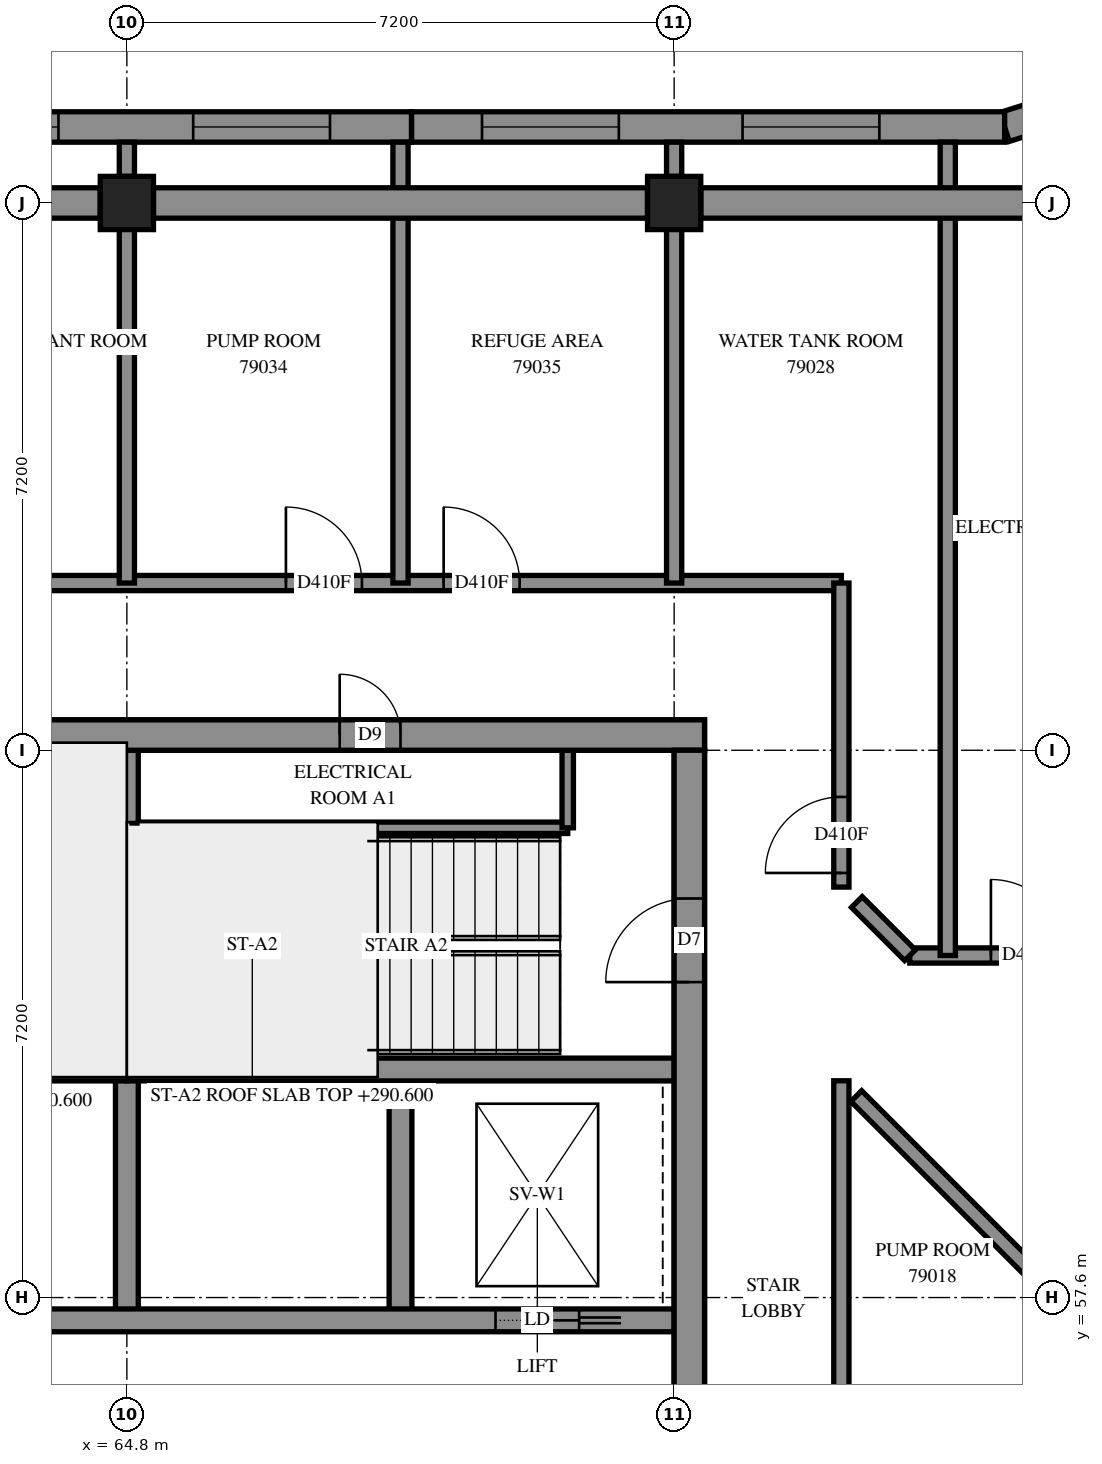
"""IFC4 building model, lengths in metres.
Left out: names, types, materials, properties, quantities, classifications, styles, units other than length and angle.
Written with IfcOpenShell. Run it as: python <this file> out.ifc"""

import sys

from ifc_helpers import new_model, si_unit, direction, frame, frame_2d, origin, origin_2d, place, context, subcontext, project, spatial, polyline, rectangle, outline, extrude, element, fill, save


model = new_model("IFC4")
c1 = context("Model", 3, precision=1e-05, world=origin(), true_north=direction((0.0, 1.0)))
c2 = subcontext(c1, "Body", "Model", "MODEL_VIEW")
j1 = project(units=[si_unit("LENGTHUNIT", "METRE"), si_unit("PLANEANGLEUNIT", "RADIAN")], contexts=[c1])
p1 = place(None, origin())
s1 = spatial("IfcSite", under=j1, at=p1, CompositionType="ELEMENT")
p2 = place(p1, origin())
s2 = spatial("IfcBuilding", under=s1, at=p2, CompositionType="ELEMENT")
p3 = place(p2, frame((0.0, 0.0, 290.6)))
s3 = spatial("IfcBuildingStorey", under=s2, at=p3, CompositionType="ELEMENT", Elevation=290.6)
for number, where, z_axis, x_axis in (
    (1, (64.8, 72.0, 0.0), (0.0, 0.0, 1.0), (1.0, 0.0, 0.0)),
    (2, (72.0, 72.0, 0.0), (0.0, 0.0, 1.0), (1.0, 0.0, 0.0)),
):
    element("IfcColumn", number, at=place(p3, frame(where, z_axis=z_axis, x_axis=x_axis)), inside=s3, PredefinedType="COLUMN", context=c2, shape_type="SweptSolid", body=[
        extrude(rectangle(XDim=0.7, YDim=0.7, at=origin_2d()), origin(), (0.0, 0.0, 1.0), 3.5),
    ])
p4 = place(p3, frame((57.2, 65.0, -0.3), z_axis=(0.0, 0.0, 1.0), x_axis=(1.0, 0.0, 0.0)))
e3 = element("IfcWall", 3, at=p4, inside=s3, PredefinedType="SHEAR", context=c2, shape_type="SweptSolid", body=[
    extrude(rectangle(XDim=15.2, YDim=0.4, at=frame_2d((7.6, 0.0))), origin(), (0.0, 0.0, 1.0), 3.1),
])
p5 = place(p4, frame((10.4, 0.0, 0.3)))
e4 = element("IfcOpeningElement", 4, at=p5, cuts=e3, PredefinedType="OPENING", context=c2, shape_type="SweptSolid", body=[
    extrude(rectangle(XDim=0.8, YDim=2.1, at=frame_2d((0.4, 1.05))), frame((0.0, 0.21, 0.0), z_axis=(0.0, -1.0, 0.0), x_axis=(1.0, 0.0, 0.0)), (0.0, 0.0, 1.0), 0.42),
])
p6 = place(p3, frame((72.2, 50.4, -0.3), z_axis=(0.0, 0.0, 1.0), x_axis=(0.0, 1.0, 0.0)))
e5 = element("IfcWall", 5, at=p6, inside=s3, PredefinedType="SHEAR", context=c2, shape_type="SweptSolid", body=[
    extrude(rectangle(XDim=14.4, YDim=0.4, at=frame_2d((7.2, 0.0))), origin(), (0.0, 0.0, 1.0), 3.1),
])
p7 = place(p6, frame((4.55, 0.0, 0.3)))
e6 = element("IfcOpeningElement", 6, at=p7, cuts=e5, PredefinedType="OPENING", context=c2, shape_type="SweptSolid", body=[
    extrude(rectangle(XDim=1.1, YDim=2.1, at=frame_2d((0.55, 1.05))), frame((0.0, 0.21, 0.0), z_axis=(0.0, -1.0, 0.0), x_axis=(1.0, 0.0, 0.0)), (0.0, 0.0, 1.0), 0.42),
])
p8 = place(p6, frame((11.35, 0.0, 0.3)))
e7 = element("IfcOpeningElement", 7, at=p8, cuts=e5, PredefinedType="OPENING", context=c2, shape_type="SweptSolid", body=[
    extrude(rectangle(XDim=1.1, YDim=2.1, at=frame_2d((0.55, 1.05))), frame((0.0, 0.21, 0.0), z_axis=(0.0, -1.0, 0.0), x_axis=(1.0, 0.0, 0.0)), (0.0, 0.0, 1.0), 0.42),
])
for number, where, z_axis, x_axis in (
    (8, (64.8, 57.3, 0.0), (0.0, 0.0, 1.0), (0.0, 1.0, 0.0)),
    (9, (68.4, 57.3, 0.0), (0.0, 0.0, 1.0), (0.0, 1.0, 0.0)),
):
    element("IfcWall", number, at=place(p3, frame(where, z_axis=z_axis, x_axis=x_axis)), inside=s3, PredefinedType="SOLIDWALL", context=c2, shape_type="SweptSolid", body=[
        extrude(rectangle(XDim=3.3, YDim=0.3, at=frame_2d((1.65, 0.0))), origin(), (0.0, 0.0, 1.0), 3.5),
    ])
p9 = place(p3, frame((57.6, 57.3, 0.0), z_axis=(0.0, 0.0, 1.0), x_axis=(1.0, 0.0, 0.0)))
e10 = element("IfcWall", 10, at=p9, inside=s3, PredefinedType="SOLIDWALL", context=c2, shape_type="SweptSolid", body=[
    extrude(rectangle(XDim=14.4, YDim=0.3, at=frame_2d((7.2, 0.0))), origin(), (0.0, 0.0, 1.0), 3.5),
])
p10 = place(p9, frame((12.05, 0.0, 0.0)))
e11 = element("IfcOpeningElement", 11, at=p10, cuts=e10, PredefinedType="OPENING", context=c2, shape_type="SweptSolid", body=[
    extrude(rectangle(XDim=1.1, YDim=2.1, at=frame_2d((0.55, 1.05))), frame((0.0, 0.16, 0.0), z_axis=(0.0, -1.0, 0.0), x_axis=(1.0, 0.0, 0.0)), (0.0, 0.0, 1.0), 0.32),
])
for number, where, z_axis, x_axis in (
    (12, (57.6, 60.6, 0.0), (0.0, 0.0, 1.0), (1.0, 0.0, 0.0)),
    (13, (64.8, 60.6, 0.0), (0.0, 0.0, 1.0), (1.0, 0.0, 0.0)),
):
    element("IfcWall", number, at=place(p3, frame(where, z_axis=z_axis, x_axis=x_axis)), inside=s3, PredefinedType="SOLIDWALL", context=c2, shape_type="SweptSolid", body=[
        extrude(rectangle(XDim=7.2, YDim=0.3, at=frame_2d((3.6, 0.0))), origin(), (0.0, 0.0, 1.0), 3.5),
    ])
p11 = place(p3, frame((64.8, 60.6, 0.0), z_axis=(0.0, 0.0, 1.0), x_axis=(0.0, 1.0, 0.0)))
e14 = element("IfcWall", 14, at=p11, inside=s3, PredefinedType="SOLIDWALL", context=c2, shape_type="SweptSolid", body=[
    extrude(rectangle(XDim=4.2, YDim=0.3, at=frame_2d((2.1, 0.0))), origin(), (0.0, 0.0, 1.0), 3.5),
])
p12 = place(p3, frame((76.513, 49.231, -0.3), z_axis=(0.0, 0.0, 1.0), x_axis=(0.7071067812, 0.7071067812, 0.0)))
e15 = element("IfcWall", 15, at=p12, inside=s3, PredefinedType="SHEAR", context=c2, shape_type="SweptSolid", body=[
    extrude(rectangle(XDim=14.4, YDim=0.4, at=frame_2d((7.2, 0.0))), origin(), (0.0, 0.0, 1.0), 3.1),
])
p13 = place(p12, frame((4.55, 0.0, 0.3)))
e16 = element("IfcOpeningElement", 16, at=p13, cuts=e15, PredefinedType="OPENING", context=c2, shape_type="SweptSolid", body=[
    extrude(rectangle(XDim=1.1, YDim=2.1, at=frame_2d((0.55, 1.05))), frame((0.0, 0.21, 0.0), z_axis=(0.0, -1.0, 0.0), x_axis=(1.0, 0.0, 0.0)), (0.0, 0.0, 1.0), 0.42),
])
p14 = place(p12, frame((11.35, 0.0, 0.3)))
e17 = element("IfcOpeningElement", 17, at=p14, cuts=e15, PredefinedType="OPENING", context=c2, shape_type="SweptSolid", body=[
    extrude(rectangle(XDim=1.1, YDim=2.1, at=frame_2d((0.55, 1.05))), frame((0.0, 0.21, 0.0), z_axis=(0.0, -1.0, 0.0), x_axis=(1.0, 0.0, 0.0)), (0.0, 0.0, 1.0), 0.42),
])
p15 = place(p3, frame((80.096, 74.189, 0.0), z_axis=(0.0, 0.0, 1.0), x_axis=(-0.9531812986, -0.3023994247, 0.0)))
e18 = element("IfcWall", 18, at=p15, inside=s3, PredefinedType="SOLIDWALL", context=c2, shape_type="SweptSolid", body=[
    extrude(outline(polyline([(-0.176, -0.2), (3.901, -0.2), (3.963, 0.2), (0.176, 0.2), (-0.176, -0.2)])), origin(), (0.0, 0.0, 1.0), 3.5),
])
p16 = place(p15, frame((1.436, 0.0, 0.7)))
e19 = element("IfcOpeningElement", 19, at=p16, cuts=e18, PredefinedType="OPENING", context=c2, shape_type="SweptSolid", body=[
    extrude(rectangle(XDim=1.8, YDim=2.2, at=frame_2d((0.9, 1.1))), frame((0.0, 0.21, 0.0), z_axis=(0.0, -1.0, 0.0), x_axis=(1.0, 0.0, 0.0)), (0.0, 0.0, 1.0), 0.42),
])
p17 = place(p3, frame((76.348, 73.0, 0.0), z_axis=(0.0, 0.0, 1.0), x_axis=(-1.0, 0.0, 0.0)))
e20 = element("IfcWall", 20, at=p17, inside=s3, PredefinedType="SOLIDWALL", context=c2, shape_type="SweptSolid", body=[
    extrude(outline(polyline([(0.031, -0.2), (7.804, -0.2), (7.804, 0.2), (-0.031, 0.2), (0.031, -0.2)])), origin(), (0.0, 0.0, 1.0), 3.5),
])
p18 = place(p17, frame((1.648, 0.0, 0.7)))
e21 = element("IfcOpeningElement", 21, at=p18, cuts=e20, PredefinedType="OPENING", context=c2, shape_type="SweptSolid", body=[
    extrude(rectangle(XDim=1.8, YDim=2.2, at=frame_2d((0.9, 1.1))), frame((0.0, 0.21, 0.0), z_axis=(0.0, -1.0, 0.0), x_axis=(1.0, 0.0, 0.0)), (0.0, 0.0, 1.0), 0.42),
])
p19 = place(p17, frame((5.076, 0.0, 0.7)))
e22 = element("IfcOpeningElement", 22, at=p19, cuts=e20, PredefinedType="OPENING", context=c2, shape_type="SweptSolid", body=[
    extrude(rectangle(XDim=1.8, YDim=2.2, at=frame_2d((0.9, 1.1))), frame((0.0, 0.21, 0.0), z_axis=(0.0, -1.0, 0.0), x_axis=(1.0, 0.0, 0.0)), (0.0, 0.0, 1.0), 0.42),
])
p20 = place(p3, frame((68.544, 73.0, 0.0), z_axis=(0.0, 0.0, 1.0), x_axis=(-1.0, 0.0, 0.0)))
e23 = element("IfcWall", 23, at=p20, inside=s3, PredefinedType="SOLIDWALL", context=c2, shape_type="SweptSolid", body=[
    extrude(outline(polyline([(0.0, -0.2), (7.773, -0.2), (7.773, 0.2), (0.0, 0.2), (0.0, -0.2)])), origin(), (0.0, 0.0, 1.0), 3.5),
])
p21 = place(p20, frame((1.072, 0.0, 0.7)))
e24 = element("IfcOpeningElement", 24, at=p21, cuts=e23, PredefinedType="OPENING", context=c2, shape_type="SweptSolid", body=[
    extrude(rectangle(XDim=1.8, YDim=2.2, at=frame_2d((0.9, 1.1))), frame((0.0, 0.21, 0.0), z_axis=(0.0, -1.0, 0.0), x_axis=(1.0, 0.0, 0.0)), (0.0, 0.0, 1.0), 0.42),
])
p22 = place(p20, frame((4.644, 0.0, 0.7)))
e25 = element("IfcOpeningElement", 25, at=p22, cuts=e23, PredefinedType="OPENING", context=c2, shape_type="SweptSolid", body=[
    extrude(rectangle(XDim=1.8, YDim=2.2, at=frame_2d((0.9, 1.1))), frame((0.0, 0.21, 0.0), z_axis=(0.0, -1.0, 0.0), x_axis=(1.0, 0.0, 0.0)), (0.0, 0.0, 1.0), 0.42),
])
p23 = place(p3, frame((64.95, 63.78, 0.0), z_axis=(0.0, 0.0, 1.0), x_axis=(1.0, 0.0, 0.0)))
e26 = element("IfcWall", 26, at=p23, inside=s3, PredefinedType="PARTITIONING", context=c2, shape_type="SweptSolid", body=[
    extrude(rectangle(XDim=5.65, YDim=0.15, at=frame_2d((2.825, 0.0))), origin(), (0.0, 0.0, 1.0), 3.5),
])
p24 = place(p3, frame((70.6, 63.78, 0.0), z_axis=(0.0, 0.0, 1.0), x_axis=(0.0, 1.0, 0.0)))
e27 = element("IfcWall", 27, at=p24, inside=s3, PredefinedType="PARTITIONING", context=c2, shape_type="SweptSolid", body=[
    extrude(rectangle(XDim=1.02, YDim=0.15, at=frame_2d((0.51, 0.0))), origin(), (0.0, 0.0, 1.0), 3.5),
])
p25 = place(p3, frame((55.4, 67.0, 0.0), z_axis=(0.0, 0.0, 1.0), x_axis=(1.0, 0.0, 0.0)))
e28 = element("IfcWall", 28, at=p25, inside=s3, PredefinedType="PARTITIONING", context=c2, shape_type="SweptSolid", body=[
    extrude(rectangle(XDim=18.8, YDim=0.2, at=frame_2d((9.4, 0.0))), origin(), (0.0, 0.0, 1.0), 3.5),
])
p26 = place(p25, frame((4.293, 0.0, 0.0)))
e29 = element("IfcOpeningElement", 29, at=p26, cuts=e28, PredefinedType="OPENING", context=c2, shape_type="SweptSolid", body=[
    extrude(rectangle(XDim=1.0, YDim=2.1, at=frame_2d((0.5, 1.05))), frame((0.0, 0.11, 0.0), z_axis=(0.0, -1.0, 0.0), x_axis=(1.0, 0.0, 0.0)), (0.0, 0.0, 1.0), 0.22),
])
p27 = place(p25, frame((6.367, 0.0, 0.0)))
e30 = element("IfcOpeningElement", 30, at=p27, cuts=e28, PredefinedType="OPENING", context=c2, shape_type="SweptSolid", body=[
    extrude(rectangle(XDim=1.0, YDim=2.1, at=frame_2d((0.5, 1.05))), frame((0.0, 0.11, 0.0), z_axis=(0.0, -1.0, 0.0), x_axis=(1.0, 0.0, 0.0)), (0.0, 0.0, 1.0), 0.22),
])
p28 = place(p25, frame((11.492, 0.0, 0.0)))
e31 = element("IfcOpeningElement", 31, at=p28, cuts=e28, PredefinedType="OPENING", context=c2, shape_type="SweptSolid", body=[
    extrude(rectangle(XDim=1.0, YDim=2.1, at=frame_2d((0.5, 1.05))), frame((0.0, 0.11, 0.0), z_axis=(0.0, -1.0, 0.0), x_axis=(1.0, 0.0, 0.0)), (0.0, 0.0, 1.0), 0.22),
])
p29 = place(p25, frame((13.568, 0.0, 0.0)))
e32 = element("IfcOpeningElement", 32, at=p29, cuts=e28, PredefinedType="OPENING", context=c2, shape_type="SweptSolid", body=[
    extrude(rectangle(XDim=1.0, YDim=2.1, at=frame_2d((0.5, 1.05))), frame((0.0, 0.11, 0.0), z_axis=(0.0, -1.0, 0.0), x_axis=(1.0, 0.0, 0.0)), (0.0, 0.0, 1.0), 0.22),
])
p30 = place(p3, frame((74.2, 54.902, 0.0), z_axis=(0.0, 0.0, 1.0), x_axis=(0.0, 1.0, 0.0)))
e33 = element("IfcWall", 33, at=p30, inside=s3, PredefinedType="PARTITIONING", context=c2, shape_type="SweptSolid", body=[
    extrude(rectangle(XDim=5.55, YDim=0.2, at=frame_2d((2.775, 0.0))), origin(), (0.0, 0.0, 1.0), 3.5),
])
for number, where, z_axis, x_axis in (
    (34, (64.8, 67.0, 0.0), (0.0, 0.0, 1.0), (0.0, 1.0, 0.0)),
    (35, (72.0, 67.0, 0.0), (0.0, 0.0, 1.0), (0.0, 1.0, 0.0)),
):
    element("IfcWall", number, at=place(p3, frame(where, z_axis=z_axis, x_axis=x_axis)), inside=s3, PredefinedType="PARTITIONING", context=c2, shape_type="SweptSolid", body=[
        extrude(rectangle(XDim=5.35, YDim=0.2, at=frame_2d((2.675, 0.0))), origin(), (0.0, 0.0, 1.0), 3.5),
    ])
p31 = place(p3, frame((74.397, 60.251, 0.0), z_axis=(0.0, 0.0, 1.0), x_axis=(0.7071067812, -0.7071067812, 0.0)))
e36 = element("IfcWall", 36, at=p31, inside=s3, PredefinedType="PARTITIONING", context=c2, shape_type="SweptSolid", body=[
    extrude(rectangle(XDim=4.526, YDim=0.2, at=frame_2d((2.263, 0.0))), origin(), (0.0, 0.0, 1.0), 3.5),
])
p32 = place(p3, frame((75.1, 62.1, 0.0), z_axis=(0.0, 0.0, 1.0), x_axis=(1.0, 0.0, 0.0)))
e37 = element("IfcWall", 37, at=p32, inside=s3, PredefinedType="PARTITIONING", context=c2, shape_type="SweptSolid", body=[
    extrude(rectangle(XDim=4.1, YDim=0.2, at=frame_2d((2.05, 0.0))), origin(), (0.0, 0.0, 1.0), 3.5),
])
p33 = place(p32, frame((1.067, 0.0, 0.0)))
e38 = element("IfcOpeningElement", 38, at=p33, cuts=e37, PredefinedType="OPENING", context=c2, shape_type="SweptSolid", body=[
    extrude(rectangle(XDim=1.0, YDim=2.1, at=frame_2d((0.5, 1.05))), frame((0.0, 0.11, 0.0), z_axis=(0.0, -1.0, 0.0), x_axis=(1.0, 0.0, 0.0)), (0.0, 0.0, 1.0), 0.22),
])
p34 = place(p3, frame((74.2, 63.0, 0.0), z_axis=(0.0, 0.0, 1.0), x_axis=(0.0, 1.0, 0.0)))
e39 = element("IfcWall", 39, at=p34, inside=s3, PredefinedType="PARTITIONING", context=c2, shape_type="SweptSolid", body=[
    extrude(rectangle(XDim=4.0, YDim=0.2, at=frame_2d((2.0, 0.0))), origin(), (0.0, 0.0, 1.0), 3.5),
])
p35 = place(p34, frame((0.186, 0.0, 0.0)))
e40 = element("IfcOpeningElement", 40, at=p35, cuts=e39, PredefinedType="OPENING", context=c2, shape_type="SweptSolid", body=[
    extrude(rectangle(XDim=1.0, YDim=2.1, at=frame_2d((0.5, 1.05))), frame((0.0, 0.11, 0.0), z_axis=(0.0, -1.0, 0.0), x_axis=(1.0, 0.0, 0.0)), (0.0, 0.0, 1.0), 0.22),
])
p36 = place(p3, frame((74.403, 62.803, 0.0), z_axis=(0.0, 0.0, 1.0), x_axis=(0.7071067812, -0.7071067812, 0.0)))
e41 = element("IfcWall", 41, at=p36, inside=s3, PredefinedType="PARTITIONING", context=c2, shape_type="SweptSolid", body=[
    extrude(rectangle(XDim=0.99, YDim=0.2, at=frame_2d((0.495, 0.0))), origin(), (0.0, 0.0, 1.0), 3.5),
])
p37 = place(p3, frame((75.6, 62.1, 0.0), z_axis=(0.0, 0.0, 1.0), x_axis=(0.0, 1.0, 0.0)))
e42 = element("IfcWall", 42, at=p37, inside=s3, PredefinedType="PARTITIONING", context=c2, shape_type="SweptSolid", body=[
    extrude(outline(polyline([(0.0, -0.1), (10.7, -0.1), (10.7, 0.1), (0.0, 0.1), (0.0, -0.1)])), origin(), (0.0, 0.0, 1.0), 3.5),
])
p38 = place(p3, frame((68.4, 67.0, 0.0), z_axis=(0.0, 0.0, 1.0), x_axis=(0.0, 1.0, 0.0)))
e43 = element("IfcWall", 43, at=p38, inside=s3, PredefinedType="PARTITIONING", context=c2, shape_type="SweptSolid", body=[
    extrude(outline(polyline([(0.0, -0.1), (5.8, -0.1), (5.8, 0.1), (0.0, 0.1), (0.0, -0.1)])), origin(), (0.0, 0.0, 1.0), 3.5),
])
for number, where, z_axis, x_axis in (
    (44, (64.8, 72.35, 0.0), (0.0, 0.0, 1.0), (0.0, 1.0, 0.0)),
    (45, (72.0, 72.35, 0.0), (0.0, 0.0, 1.0), (0.0, 1.0, 0.0)),
):
    element("IfcWall", number, at=place(p3, frame(where, z_axis=z_axis, x_axis=x_axis)), inside=s3, PredefinedType="PARTITIONING", context=c2, shape_type="SweptSolid", body=[
        extrude(outline(polyline([(0.0, -0.1), (0.45, -0.1), (0.45, 0.1), (0.0, 0.1), (0.0, -0.1)])), origin(), (0.0, 0.0, 1.0), 3.5),
    ])
p39 = place(p18, origin())
e46 = element("IfcWindow", 46, at=p39, inside=s3, PartitioningType="SINGLE_PANEL", PredefinedType="WINDOW", context=c2, shape_type="SweptSolid", body=[
    extrude(rectangle(XDim=1.8, YDim=2.2, at=frame_2d((0.9, 1.1))), frame((0.0, 0.08, 0.0), z_axis=(0.0, -1.0, 0.0), x_axis=(1.0, 0.0, 0.0)), (0.0, 0.0, 1.0), 0.06),
])
fill(e21, e46)
p40 = place(p19, origin())
e47 = element("IfcWindow", 47, at=p40, inside=s3, PartitioningType="SINGLE_PANEL", PredefinedType="WINDOW", context=c2, shape_type="SweptSolid", body=[
    extrude(rectangle(XDim=1.8, YDim=2.2, at=frame_2d((0.9, 1.1))), frame((0.0, 0.08, 0.0), z_axis=(0.0, -1.0, 0.0), x_axis=(1.0, 0.0, 0.0)), (0.0, 0.0, 1.0), 0.06),
])
fill(e22, e47)
p41 = place(p21, origin())
e48 = element("IfcWindow", 48, at=p41, inside=s3, PartitioningType="SINGLE_PANEL", PredefinedType="WINDOW", context=c2, shape_type="SweptSolid", body=[
    extrude(rectangle(XDim=1.8, YDim=2.2, at=frame_2d((0.9, 1.1))), frame((0.0, 0.08, 0.0), z_axis=(0.0, -1.0, 0.0), x_axis=(1.0, 0.0, 0.0)), (0.0, 0.0, 1.0), 0.06),
])
fill(e24, e48)
p42 = place(p22, origin())
e49 = element("IfcWindow", 49, at=p42, inside=s3, PartitioningType="SINGLE_PANEL", PredefinedType="WINDOW", context=c2, shape_type="SweptSolid", body=[
    extrude(rectangle(XDim=1.8, YDim=2.2, at=frame_2d((0.9, 1.1))), frame((0.0, 0.08, 0.0), z_axis=(0.0, -1.0, 0.0), x_axis=(1.0, 0.0, 0.0)), (0.0, 0.0, 1.0), 0.06),
])
fill(e25, e49)
p43 = place(p5, origin())
e50 = element("IfcDoor", 50, at=p43, inside=s3, OperationType="SINGLE_SWING_RIGHT", PredefinedType="DOOR", context=c2, shape_type="SweptSolid", body=[
    extrude(rectangle(XDim=0.8, YDim=2.1, at=frame_2d((0.4, 1.05))), frame((0.0, 0.025, 0.0), z_axis=(0.0, -1.0, 0.0), x_axis=(1.0, 0.0, 0.0)), (0.0, 0.0, 1.0), 0.05),
])
fill(e4, e50)
p44 = place(p8, origin())
e51 = element("IfcDoor", 51, at=p44, inside=s3, OperationType="SINGLE_SWING_RIGHT", PredefinedType="DOOR", context=c2, shape_type="SweptSolid", body=[
    extrude(rectangle(XDim=1.1, YDim=2.1, at=frame_2d((0.55, 1.05))), frame((0.0, 0.025, 0.0), z_axis=(0.0, -1.0, 0.0), x_axis=(1.0, 0.0, 0.0)), (0.0, 0.0, 1.0), 0.05),
])
fill(e7, e51)
p45 = place(p10, origin())
e52 = element("IfcDoor", 52, at=p45, inside=s3, OperationType="SLIDING_TO_RIGHT", PredefinedType="DOOR", context=c2, shape_type="SweptSolid", body=[
    extrude(rectangle(XDim=1.1, YDim=2.1, at=frame_2d((0.55, 1.05))), frame((0.0, 0.025, 0.0), z_axis=(0.0, -1.0, 0.0), x_axis=(1.0, 0.0, 0.0)), (0.0, 0.0, 1.0), 0.05),
])
fill(e11, e52)
p46 = place(p35, origin())
e53 = element("IfcDoor", 53, at=p46, inside=s3, OperationType="SINGLE_SWING_RIGHT", PredefinedType="DOOR", context=c2, shape_type="SweptSolid", body=[
    extrude(rectangle(XDim=1.0, YDim=2.1, at=frame_2d((0.5, 1.05))), frame((0.0, 0.025, 0.0), z_axis=(0.0, -1.0, 0.0), x_axis=(1.0, 0.0, 0.0)), (0.0, 0.0, 1.0), 0.05),
])
fill(e40, e53)
p47 = place(p33, origin())
e54 = element("IfcDoor", 54, at=p47, inside=s3, OperationType="SINGLE_SWING_LEFT", PredefinedType="DOOR", context=c2, shape_type="SweptSolid", body=[
    extrude(rectangle(XDim=1.0, YDim=2.1, at=frame_2d((0.5, 1.05))), frame((0.0, 0.025, 0.0), z_axis=(0.0, -1.0, 0.0), x_axis=(1.0, 0.0, 0.0)), (0.0, 0.0, 1.0), 0.05),
])
fill(e38, e54)
p48 = place(p28, origin())
e55 = element("IfcDoor", 55, at=p48, inside=s3, OperationType="SINGLE_SWING_RIGHT", PredefinedType="DOOR", context=c2, shape_type="SweptSolid", body=[
    extrude(rectangle(XDim=1.0, YDim=2.1, at=frame_2d((0.5, 1.05))), frame((0.0, 0.025, 0.0), z_axis=(0.0, -1.0, 0.0), x_axis=(1.0, 0.0, 0.0)), (0.0, 0.0, 1.0), 0.05),
])
fill(e31, e55)
p49 = place(p29, origin())
e56 = element("IfcDoor", 56, at=p49, inside=s3, OperationType="SINGLE_SWING_LEFT", PredefinedType="DOOR", context=c2, shape_type="SweptSolid", body=[
    extrude(rectangle(XDim=1.0, YDim=2.1, at=frame_2d((0.5, 1.05))), frame((0.0, 0.025, 0.0), z_axis=(0.0, -1.0, 0.0), x_axis=(1.0, 0.0, 0.0)), (0.0, 0.0, 1.0), 0.05),
])
fill(e32, e56)
save(model, sys.argv[1])
